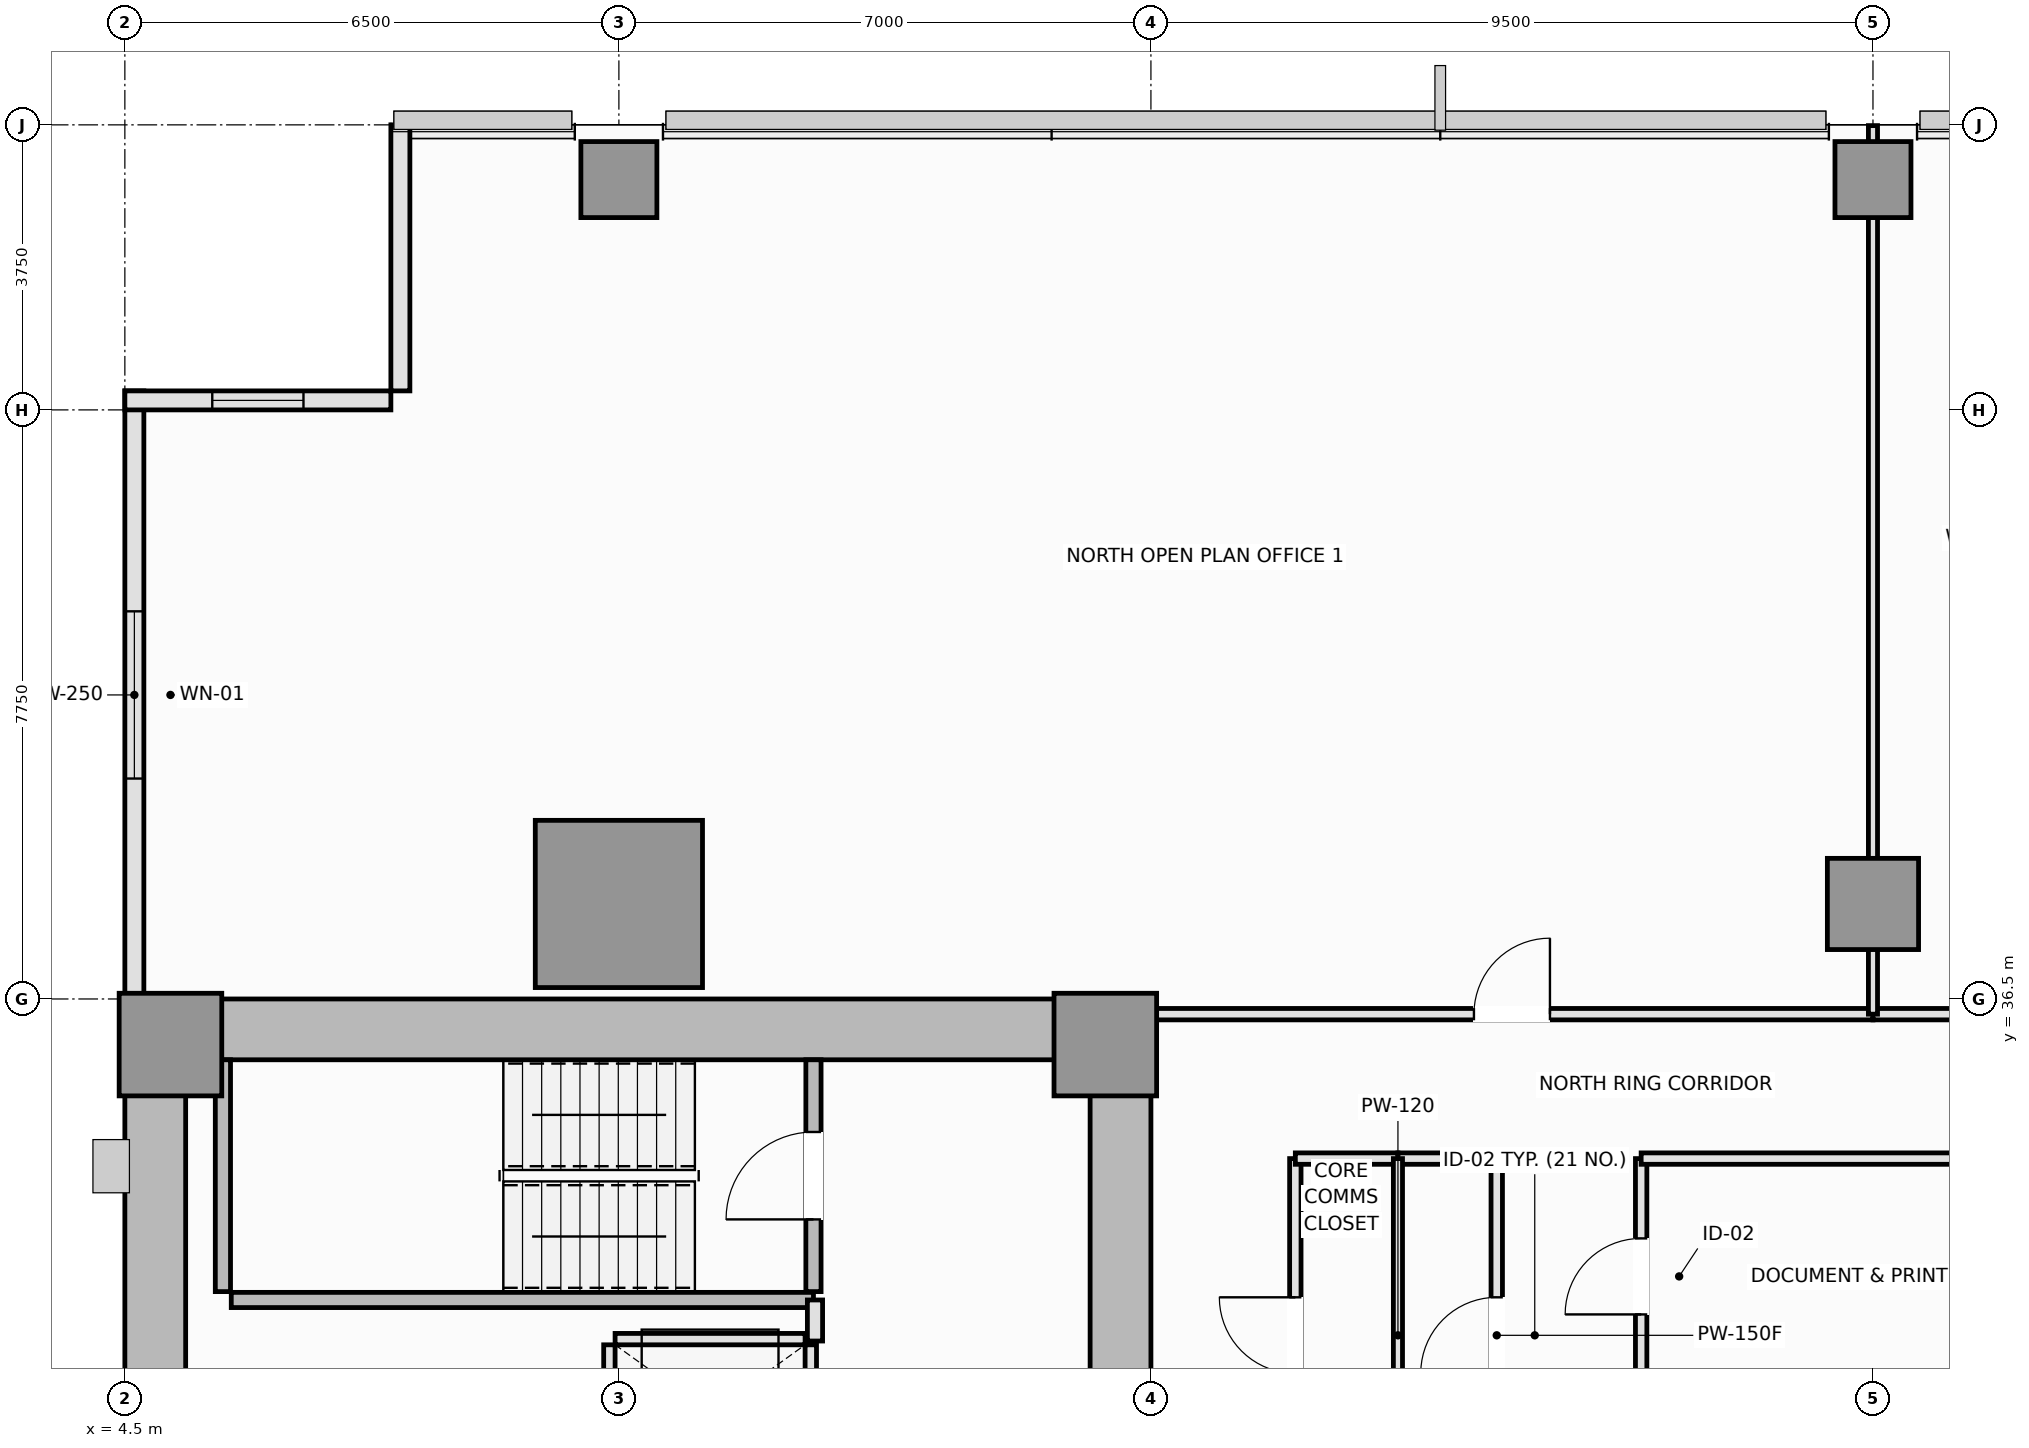
"""IFC4 building model, lengths in metres.
Left out: names, types, materials, properties, quantities, classifications, styles, units other than length and angle.
Written with IfcOpenShell. Run it as: python <this file> out.ifc"""

import sys

from ifc_helpers import new_model, si_unit, direction, frame, frame_2d, origin, origin_2d, place, context, subcontext, project, spatial, rectangle, extrude, element, fill, save


model = new_model("IFC4")
c1 = context("Model", 3, precision=1e-05, world=origin(), true_north=direction((0.0, 1.0)))
c2 = subcontext(c1, "Body", "Model", "MODEL_VIEW")
j1 = project(units=[si_unit("LENGTHUNIT", "METRE"), si_unit("PLANEANGLEUNIT", "RADIAN")], contexts=[c1])
p1 = place(None, origin())
s1 = spatial("IfcSite", under=j1, at=p1, CompositionType="ELEMENT")
p2 = place(p1, origin())
s2 = spatial("IfcBuilding", under=s1, at=p2, CompositionType="ELEMENT")
p3 = place(p2, frame((0.0, 0.0, 78.85)))
s3 = spatial("IfcBuildingStorey", under=s2, at=p3, CompositionType="ELEMENT", Elevation=78.85)
p4 = place(p3, frame((4.5, 36.1, 0.0), z_axis=(0.0, 0.0, 1.0), x_axis=(1.0, 0.0, 0.0)))
e1 = element("IfcWall", 1, at=p4, inside=s3, PredefinedType="SHEAR", context=c2, shape_type="SweptSolid", body=[
    extrude(rectangle(XDim=13.5, YDim=0.8, at=frame_2d((6.75, 0.0))), origin(), (0.0, 0.0, 1.0), 3.55),
])
p5 = place(p3, frame((4.9, 14.8, 0.0), z_axis=(0.0, 0.0, 1.0), x_axis=(0.0, 1.0, 0.0)))
e2 = element("IfcWall", 2, at=p5, inside=s3, PredefinedType="SHEAR", context=c2, shape_type="SweptSolid", body=[
    extrude(rectangle(XDim=20.9, YDim=0.8, at=frame_2d((10.45, 0.0))), origin(), (0.0, 0.0, 1.0), 3.55),
])
p6 = place(p3, frame((17.6, 27.05, 0.0), z_axis=(0.0, 0.0, 1.0), x_axis=(0.0, 1.0, 0.0)))
e3 = element("IfcWall", 3, at=p6, inside=s3, PredefinedType="SHEAR", context=c2, shape_type="SweptSolid", body=[
    extrude(rectangle(XDim=8.65, YDim=0.8, at=frame_2d((4.325, 0.0))), origin(), (0.0, 0.0, 1.0), 3.55),
])
p7 = place(p6, frame((3.45, 0.0, 0.0)))
e4 = element("IfcOpeningElement", 4, at=p7, cuts=e3, PredefinedType="OPENING", context=c2, shape_type="SweptSolid", body=[
    extrude(rectangle(XDim=1.1, YDim=2.15, at=frame_2d((0.55, 1.075))), frame((0.0, 0.41, 0.0), z_axis=(0.0, -1.0, 0.0), x_axis=(1.0, 0.0, 0.0)), (0.0, 0.0, 1.0), 0.82),
])
for number, where, z_axis, x_axis in (
    (5, (5.1, 35.9, 0.0), (0.0, 0.0, 1.0), (1.0, 0.0, 0.0)),
    (6, (17.4, 35.9, 0.0), (0.0, 0.0, 1.0), (1.0, 0.0, 0.0)),
):
    element("IfcColumn", number, at=place(p3, frame(where, z_axis=z_axis, x_axis=x_axis)), inside=s3, PredefinedType="PILASTER", context=c2, shape_type="SweptSolid", body=[
        extrude(rectangle(XDim=1.35, YDim=1.35, at=origin_2d()), origin(), (0.0, 0.0, 1.0), 3.55),
    ])
p8 = place(p3, frame((11.0, 37.75, 0.0), z_axis=(0.0, 0.0, 1.0), x_axis=(1.0, 0.0, 0.0)))
e7 = element("IfcColumn", 7, at=p8, inside=s3, PredefinedType="COLUMN", context=c2, shape_type="SweptSolid", body=[
    extrude(rectangle(XDim=2.2, YDim=2.2, at=origin_2d()), origin(), (0.0, 0.0, 1.0), 3.55),
])
p9 = place(p3, frame((27.5, 37.75, 0.0), z_axis=(0.0, 0.0, 1.0), x_axis=(1.0, 0.0, 0.0)))
e8 = element("IfcColumn", 8, at=p9, inside=s3, PredefinedType="COLUMN", context=c2, shape_type="SweptSolid", body=[
    extrude(rectangle(XDim=1.2, YDim=1.2, at=origin_2d()), origin(), (0.0, 0.0, 1.0), 3.55),
])
for number, where, z_axis, x_axis in (
    (9, (11.0, 47.28, 0.0), (0.0, 0.0, 1.0), (1.0, 0.0, 0.0)),
    (10, (27.5, 47.28, 0.0), (0.0, 0.0, 1.0), (1.0, 0.0, 0.0)),
):
    element("IfcColumn", number, at=place(p3, frame(where, z_axis=z_axis, x_axis=x_axis)), inside=s3, PredefinedType="COLUMN", context=c2, shape_type="SweptSolid", body=[
        extrude(rectangle(XDim=1.0, YDim=1.0, at=origin_2d()), origin(), (0.0, 0.0, 1.0), 3.55),
    ])
p10 = place(p3, frame((4.625, 44.5, 0.0), z_axis=(0.0, 0.0, 1.0), x_axis=(0.0, -1.0, 0.0)))
e11 = element("IfcWall", 11, at=p10, inside=s3, PredefinedType="SOLIDWALL", context=c2, shape_type="SweptSolid", body=[
    extrude(rectangle(XDim=8.0, YDim=0.25, at=frame_2d((4.0, 0.0))), origin(), (0.0, 0.0, 1.0), 3.37),
])
p11 = place(p10, frame((2.9, 0.0, 0.9)))
e12 = element("IfcOpeningElement", 12, at=p11, cuts=e11, PredefinedType="OPENING", context=c2, shape_type="SweptSolid", body=[
    extrude(rectangle(XDim=2.2, YDim=1.8, at=frame_2d((1.1, 0.9))), frame((0.0, 0.135, 0.0), z_axis=(0.0, -1.0, 0.0), x_axis=(1.0, 0.0, 0.0)), (0.0, 0.0, 1.0), 0.27),
])
p12 = place(p3, frame((8.125, 48.0, 0.0), z_axis=(0.0, 0.0, 1.0), x_axis=(0.0, -1.0, 0.0)))
e13 = element("IfcWall", 13, at=p12, inside=s3, PredefinedType="SOLIDWALL", context=c2, shape_type="SweptSolid", body=[
    extrude(rectangle(XDim=3.5, YDim=0.25, at=frame_2d((1.75, 0.0))), origin(), (0.0, 0.0, 1.0), 3.37),
])
p13 = place(p3, frame((8.0, 44.375, 0.0), z_axis=(0.0, 0.0, 1.0), x_axis=(-1.0, 0.0, 0.0)))
e14 = element("IfcWall", 14, at=p13, inside=s3, PredefinedType="SOLIDWALL", context=c2, shape_type="SweptSolid", body=[
    extrude(rectangle(XDim=3.5, YDim=0.25, at=frame_2d((1.75, 0.0))), origin(), (0.0, 0.0, 1.0), 3.37),
])
p14 = place(p13, frame((1.15, 0.0, 0.9)))
e15 = element("IfcOpeningElement", 15, at=p14, cuts=e14, PredefinedType="OPENING", context=c2, shape_type="SweptSolid", body=[
    extrude(rectangle(XDim=1.2, YDim=1.8, at=frame_2d((0.6, 0.9))), frame((0.0, 0.135, 0.0), z_axis=(0.0, -1.0, 0.0), x_axis=(1.0, 0.0, 0.0)), (0.0, 0.0, 1.0), 0.27),
])
p15 = place(p3, frame((5.79, 32.65, 0.0), z_axis=(0.0, 0.0, 1.0), x_axis=(0.0, 1.0, 0.0)))
e16 = element("IfcWall", 16, at=p15, inside=s3, PredefinedType="SOLIDWALL", context=c2, shape_type="SweptSolid", body=[
    extrude(rectangle(XDim=3.05, YDim=0.2, at=frame_2d((1.525, 0.0))), origin(), (0.0, 0.0, 1.0), 3.55),
])
p16 = place(p3, frame((5.9, 32.54, 0.0), z_axis=(0.0, 0.0, 1.0), x_axis=(1.0, 0.0, 0.0)))
e17 = element("IfcWall", 17, at=p16, inside=s3, PredefinedType="SOLIDWALL", context=c2, shape_type="SweptSolid", body=[
    extrude(rectangle(XDim=7.66, YDim=0.2, at=frame_2d((3.83, 0.0))), origin(), (0.0, 0.0, 1.0), 3.55),
])
p17 = place(p3, frame((13.56, 32.65, 0.0), z_axis=(0.0, 0.0, 1.0), x_axis=(0.0, 1.0, 0.0)))
e18 = element("IfcWall", 18, at=p17, inside=s3, PredefinedType="SOLIDWALL", context=c2, shape_type="SweptSolid", body=[
    extrude(rectangle(XDim=3.05, YDim=0.2, at=frame_2d((1.525, 0.0))), origin(), (0.0, 0.0, 1.0), 3.55),
])
p18 = place(p17, frame((0.95, 0.0, 0.0)))
e19 = element("IfcOpeningElement", 19, at=p18, cuts=e18, PredefinedType="OPENING", context=c2, shape_type="SweptSolid", body=[
    extrude(rectangle(XDim=1.15, YDim=2.15, at=frame_2d((0.575, 1.075))), frame((0.0, 0.11, 0.0), z_axis=(0.0, -1.0, 0.0), x_axis=(1.0, 0.0, 0.0)), (0.0, 0.0, 1.0), 0.22),
])
p19 = place(p3, frame((10.95, 32.025, 0.0), z_axis=(0.0, 0.0, 1.0), x_axis=(1.0, 0.0, 0.0)))
e20 = element("IfcWall", 20, at=p19, inside=s3, PredefinedType="PARTITIONING", context=c2, shape_type="SweptSolid", body=[
    extrude(rectangle(XDim=2.5, YDim=0.15, at=frame_2d((1.25, 0.0))), origin(), (0.0, 0.0, 1.0), 3.37),
])
p20 = place(p3, frame((10.875, 30.15, 0.0), z_axis=(0.0, 0.0, 1.0), x_axis=(0.0, 1.0, 0.0)))
e21 = element("IfcWall", 21, at=p20, inside=s3, PredefinedType="PARTITIONING", context=c2, shape_type="SweptSolid", body=[
    extrude(rectangle(XDim=1.8, YDim=0.15, at=frame_2d((0.9, 0.0))), origin(), (0.0, 0.0, 1.0), 3.37),
])
p21 = place(p3, frame((13.525, 30.15, 0.0), z_axis=(0.0, 0.0, 1.0), x_axis=(0.0, 1.0, 0.0)))
e22 = element("IfcWall", 22, at=p21, inside=s3, PredefinedType="PARTITIONING", context=c2, shape_type="SweptSolid", body=[
    extrude(rectangle(XDim=1.8, YDim=0.15, at=frame_2d((0.9, 0.0))), origin(), (0.0, 0.0, 1.0), 3.37),
])
p22 = place(p21, frame((0.35, 0.0, 0.0)))
e23 = element("IfcOpeningElement", 23, at=p22, cuts=e22, PredefinedType="OPENING", context=c2, shape_type="SweptSolid", body=[
    extrude(rectangle(XDim=1.1, YDim=2.2, at=frame_2d((0.55, 1.1))), frame((0.0, 0.085, 0.0), z_axis=(0.0, -1.0, 0.0), x_axis=(1.0, 0.0, 0.0)), (0.0, 0.0, 1.0), 0.17),
])
p23 = place(p3, frame((13.58, 32.0, 0.0), z_axis=(0.0, 0.0, 1.0), x_axis=(0.0, 1.0, 0.0)))
e24 = element("IfcWall", 24, at=p23, inside=s3, PredefinedType="PARTITIONING", context=c2, shape_type="SweptSolid", body=[
    extrude(rectangle(XDim=0.54, YDim=0.2, at=frame_2d((0.27, 0.0))), origin(), (0.0, 0.0, 1.0), 3.37),
])
p24 = place(p3, frame((22.55, 29.75, 0.0), z_axis=(0.0, 0.0, 1.0), x_axis=(0.0, 1.0, 0.0)))
e25 = element("IfcWall", 25, at=p24, inside=s3, PredefinedType="PARTITIONING", context=c2, shape_type="SweptSolid", body=[
    extrude(rectangle(XDim=4.65, YDim=0.15, at=frame_2d((2.325, 0.0))), origin(), (0.0, 0.0, 1.0), 3.01),
])
p25 = place(p24, frame((1.825, 0.0, 0.0)))
e26 = element("IfcOpeningElement", 26, at=p25, cuts=e25, PredefinedType="OPENING", context=c2, shape_type="SweptSolid", body=[
    extrude(rectangle(XDim=1.0, YDim=2.15, at=frame_2d((0.5, 1.075))), frame((0.0, 0.085, 0.0), z_axis=(0.0, -1.0, 0.0), x_axis=(1.0, 0.0, 0.0)), (0.0, 0.0, 1.0), 0.17),
])
p26 = place(p3, frame((24.45, 31.3, 0.0), z_axis=(0.0, 0.0, 1.0), x_axis=(0.0, 1.0, 0.0)))
e27 = element("IfcWall", 27, at=p26, inside=s3, PredefinedType="PARTITIONING", context=c2, shape_type="SweptSolid", body=[
    extrude(rectangle(XDim=3.1, YDim=0.15, at=frame_2d((1.55, 0.0))), origin(), (0.0, 0.0, 1.0), 3.37),
])
p27 = place(p26, frame((1.05, 0.0, 0.0)))
e28 = element("IfcOpeningElement", 28, at=p27, cuts=e27, PredefinedType="OPENING", context=c2, shape_type="SweptSolid", body=[
    extrude(rectangle(XDim=1.0, YDim=2.15, at=frame_2d((0.5, 1.075))), frame((0.0, 0.085, 0.0), z_axis=(0.0, -1.0, 0.0), x_axis=(1.0, 0.0, 0.0)), (0.0, 0.0, 1.0), 0.17),
])
p28 = place(p3, frame((19.9, 29.75, 0.0), z_axis=(0.0, 0.0, 1.0), x_axis=(0.0, 1.0, 0.0)))
e29 = element("IfcWall", 29, at=p28, inside=s3, PredefinedType="PARTITIONING", context=c2, shape_type="SweptSolid", body=[
    extrude(rectangle(XDim=4.65, YDim=0.15, at=frame_2d((2.325, 0.0))), origin(), (0.0, 0.0, 1.0), 3.37),
])
p29 = place(p28, frame((1.825, 0.0, 0.0)))
e30 = element("IfcOpeningElement", 30, at=p29, cuts=e29, PredefinedType="OPENING", context=c2, shape_type="SweptSolid", body=[
    extrude(rectangle(XDim=1.0, YDim=2.15, at=frame_2d((0.5, 1.075))), frame((0.0, 0.085, 0.0), z_axis=(0.0, -1.0, 0.0), x_axis=(1.0, 0.0, 0.0)), (0.0, 0.0, 1.0), 0.17),
])
p30 = place(p3, frame((19.9, 34.4, 0.0), z_axis=(0.0, 0.0, 1.0), x_axis=(1.0, 0.0, 0.0)))
e31 = element("IfcWall", 31, at=p30, inside=s3, PredefinedType="PARTITIONING", context=c2, shape_type="SweptSolid", body=[
    extrude(rectangle(XDim=1.35, YDim=0.15, at=frame_2d((0.675, 0.0))), origin(), (0.0, 0.0, 1.0), 3.37),
])
p31 = place(p3, frame((21.25, 34.4, 0.0), z_axis=(0.0, 0.0, 1.0), x_axis=(1.0, 0.0, 0.0)))
e32 = element("IfcWall", 32, at=p31, inside=s3, PredefinedType="PARTITIONING", context=c2, shape_type="SweptSolid", body=[
    extrude(rectangle(XDim=1.3, YDim=0.15, at=frame_2d((0.65, 0.0))), origin(), (0.0, 0.0, 1.0), 3.37),
])
p32 = place(p3, frame((24.45, 34.4, 0.0), z_axis=(0.0, 0.0, 1.0), x_axis=(1.0, 0.0, 0.0)))
e33 = element("IfcWall", 33, at=p32, inside=s3, PredefinedType="PARTITIONING", context=c2, shape_type="SweptSolid", body=[
    extrude(rectangle(XDim=6.35, YDim=0.15, at=frame_2d((3.175, 0.0))), origin(), (0.0, 0.0, 1.0), 3.37),
])
p33 = place(p3, frame((18.0, 36.3, 0.0), z_axis=(0.0, 0.0, 1.0), x_axis=(1.0, 0.0, 0.0)))
e34 = element("IfcWall", 34, at=p33, inside=s3, PredefinedType="PARTITIONING", context=c2, shape_type="SweptSolid", body=[
    extrude(rectangle(XDim=9.5, YDim=0.15, at=frame_2d((4.75, 0.0))), origin(), (0.0, 0.0, 1.0), 3.37),
])
p34 = place(p33, frame((4.25, 0.0, 0.0)))
e35 = element("IfcOpeningElement", 35, at=p34, cuts=e34, PredefinedType="OPENING", context=c2, shape_type="SweptSolid", body=[
    extrude(rectangle(XDim=1.0, YDim=2.15, at=frame_2d((0.5, 1.075))), frame((0.0, 0.085, 0.0), z_axis=(0.0, -1.0, 0.0), x_axis=(1.0, 0.0, 0.0)), (0.0, 0.0, 1.0), 0.17),
])
p35 = place(p3, frame((27.5, 36.3, 0.0), z_axis=(0.0, 0.0, 1.0), x_axis=(1.0, 0.0, 0.0)))
e36 = element("IfcWall", 36, at=p35, inside=s3, PredefinedType="PARTITIONING", context=c2, shape_type="SweptSolid", body=[
    extrude(rectangle(XDim=3.5, YDim=0.15, at=frame_2d((1.75, 0.0))), origin(), (0.0, 0.0, 1.0), 3.37),
])
p36 = place(p35, frame((1.25, 0.0, 0.0)))
e37 = element("IfcOpeningElement", 37, at=p36, cuts=e36, PredefinedType="OPENING", context=c2, shape_type="SweptSolid", body=[
    extrude(rectangle(XDim=1.0, YDim=2.15, at=frame_2d((0.5, 1.075))), frame((0.0, 0.085, 0.0), z_axis=(0.0, -1.0, 0.0), x_axis=(1.0, 0.0, 0.0)), (0.0, 0.0, 1.0), 0.17),
])
p37 = place(p3, frame((21.25, 29.75, 0.0), z_axis=(0.0, 0.0, 1.0), x_axis=(0.0, 1.0, 0.0)))
e38 = element("IfcWall", 38, at=p37, inside=s3, PredefinedType="PARTITIONING", context=c2, shape_type="SweptSolid", body=[
    extrude(rectangle(XDim=4.65, YDim=0.12, at=frame_2d((2.325, 0.0))), origin(), (0.0, 0.0, 1.0), 3.37),
])
p38 = place(p3, frame((27.5, 36.3, 0.0), z_axis=(0.0, 0.0, 1.0), x_axis=(0.0, 1.0, 0.0)))
e39 = element("IfcWall", 39, at=p38, inside=s3, PredefinedType="PARTITIONING", context=c2, shape_type="SweptSolid", body=[
    extrude(rectangle(XDim=11.69, YDim=0.12, at=frame_2d((5.845, 0.0))), origin(), (0.0, 0.0, 1.0), 2.82),
])
p39 = place(p11, origin())
e40 = element("IfcWindow", 40, at=p39, inside=s3, PartitioningType="SINGLE_PANEL", PredefinedType="WINDOW", context=c2, shape_type="SweptSolid", body=[
    extrude(rectangle(XDim=2.2, YDim=1.8, at=frame_2d((1.1, 0.9))), frame((0.0, 0.03, 0.0), z_axis=(0.0, -1.0, 0.0), x_axis=(1.0, 0.0, 0.0)), (0.0, 0.0, 1.0), 0.06),
])
fill(e12, e40)
p40 = place(p14, origin())
e41 = element("IfcWindow", 41, at=p40, inside=s3, PartitioningType="SINGLE_PANEL", PredefinedType="WINDOW", context=c2, shape_type="SweptSolid", body=[
    extrude(rectangle(XDim=1.2, YDim=1.8, at=frame_2d((0.6, 0.9))), frame((0.0, 0.03, 0.0), z_axis=(0.0, -1.0, 0.0), x_axis=(1.0, 0.0, 0.0)), (0.0, 0.0, 1.0), 0.06),
])
fill(e15, e41)
p41 = place(p18, origin())
e42 = element("IfcDoor", 42, at=p41, inside=s3, OperationType="SINGLE_SWING_LEFT", PredefinedType="DOOR", context=c2, shape_type="SweptSolid", body=[
    extrude(rectangle(XDim=1.15, YDim=2.15, at=frame_2d((0.575, 1.075))), frame((0.0, 0.025, 0.0), z_axis=(0.0, -1.0, 0.0), x_axis=(1.0, 0.0, 0.0)), (0.0, 0.0, 1.0), 0.05),
])
fill(e19, e42)
p42 = place(p25, origin())
e43 = element("IfcDoor", 43, at=p42, inside=s3, OperationType="SINGLE_SWING_LEFT", PredefinedType="DOOR", context=c2, shape_type="SweptSolid", body=[
    extrude(rectangle(XDim=1.0, YDim=2.15, at=frame_2d((0.5, 1.075))), frame((0.0, 0.025, 0.0), z_axis=(0.0, -1.0, 0.0), x_axis=(1.0, 0.0, 0.0)), (0.0, 0.0, 1.0), 0.05),
])
fill(e26, e43)
p43 = place(p27, origin())
e44 = element("IfcDoor", 44, at=p43, inside=s3, OperationType="SINGLE_SWING_LEFT", PredefinedType="DOOR", context=c2, shape_type="SweptSolid", body=[
    extrude(rectangle(XDim=1.0, YDim=2.15, at=frame_2d((0.5, 1.075))), frame((0.0, 0.025, 0.0), z_axis=(0.0, -1.0, 0.0), x_axis=(1.0, 0.0, 0.0)), (0.0, 0.0, 1.0), 0.05),
])
fill(e28, e44)
p44 = place(p29, origin())
e45 = element("IfcDoor", 45, at=p44, inside=s3, OperationType="SINGLE_SWING_RIGHT", PredefinedType="DOOR", context=c2, shape_type="SweptSolid", body=[
    extrude(rectangle(XDim=1.0, YDim=2.15, at=frame_2d((0.5, 1.075))), frame((0.0, 0.025, 0.0), z_axis=(0.0, -1.0, 0.0), x_axis=(1.0, 0.0, 0.0)), (0.0, 0.0, 1.0), 0.05),
])
fill(e30, e45)
p45 = place(p34, origin())
e46 = element("IfcDoor", 46, at=p45, inside=s3, OperationType="SINGLE_SWING_RIGHT", PredefinedType="DOOR", context=c2, shape_type="SweptSolid", body=[
    extrude(rectangle(XDim=1.0, YDim=2.15, at=frame_2d((0.5, 1.075))), frame((0.0, 0.025, 0.0), z_axis=(0.0, -1.0, 0.0), x_axis=(1.0, 0.0, 0.0)), (0.0, 0.0, 1.0), 0.05),
])
fill(e35, e46)
save(model, sys.argv[1])
